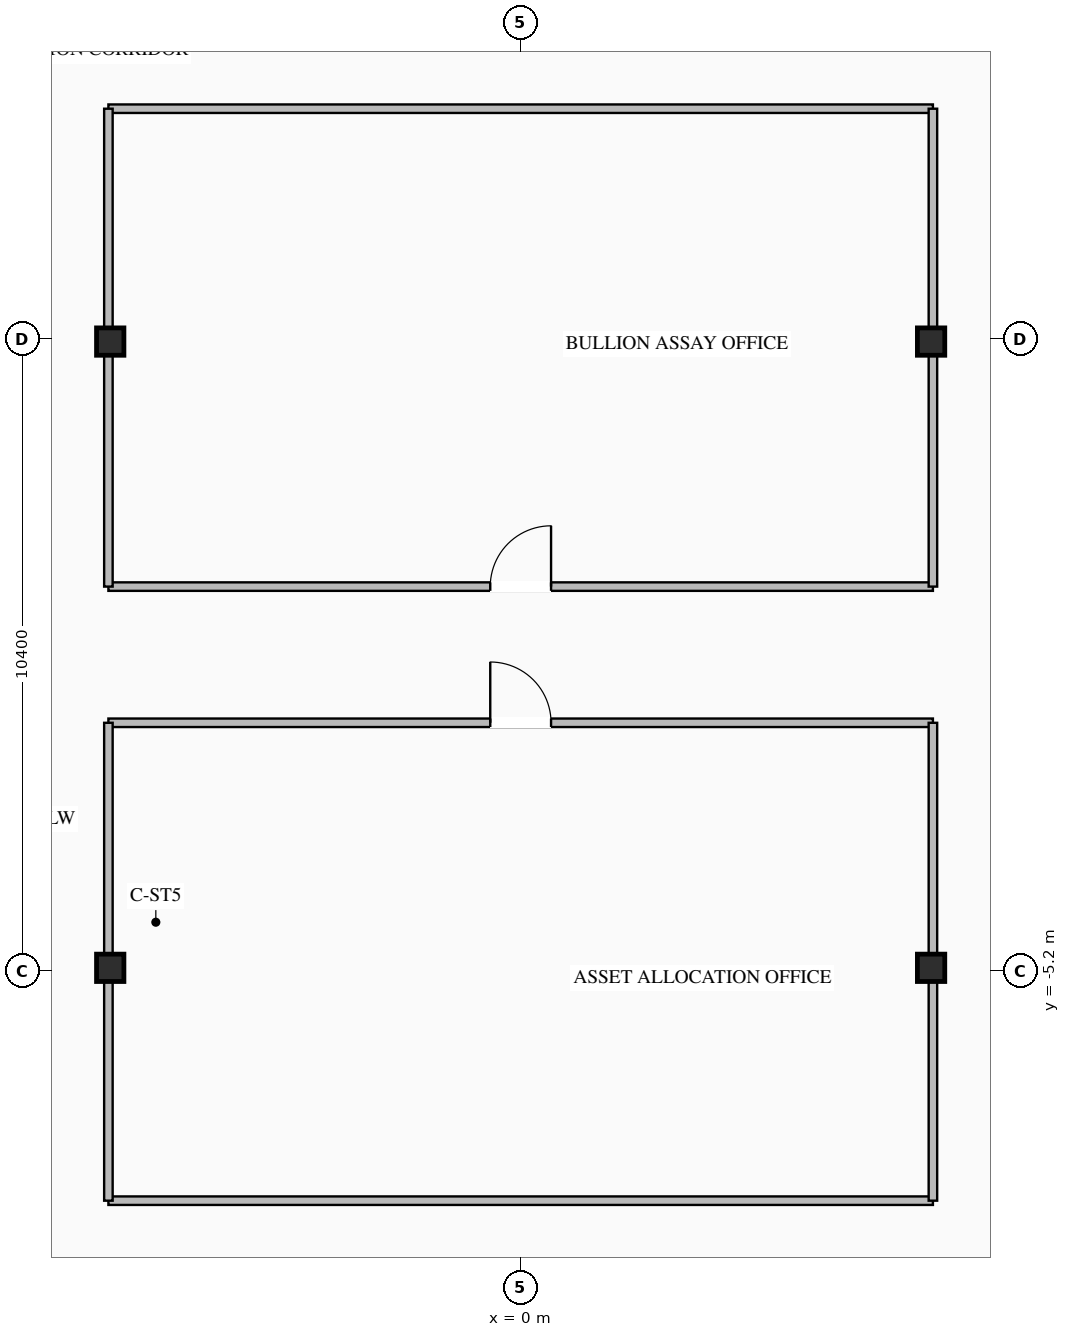
"""IFC4 building model, lengths in metres.
Left out: names, types, materials, properties, quantities, classifications, styles, units other than length and angle.
Written with IfcOpenShell. Run it as: python <this file> out.ifc"""

import sys

from ifc_helpers import new_model, si_unit, direction, frame, frame_2d, origin, origin_2d, place, context, subcontext, project, spatial, rectangle, i_section, extrude, element, fill, save


model = new_model("IFC4")
c1 = context("Model", 3, precision=1e-05, world=origin(), true_north=direction((0.0, 1.0)))
c2 = subcontext(c1, "Body", "Model", "MODEL_VIEW")
j1 = project(units=[si_unit("LENGTHUNIT", "METRE"), si_unit("PLANEANGLEUNIT", "RADIAN")], contexts=[c1])
p1 = place(None, origin())
s1 = spatial("IfcSite", under=j1, at=p1, CompositionType="ELEMENT")
p2 = place(p1, origin())
s2 = spatial("IfcBuilding", under=s1, at=p2, CompositionType="ELEMENT")
p3 = place(p2, frame((0.0, 0.0, 247.5)))
s3 = spatial("IfcBuildingStorey", under=s2, at=p3, CompositionType="ELEMENT", Elevation=247.5)
for number, where, z_axis, x_axis in (
    (1, (-6.75, -5.15, 0.0), (0.0, 0.0, 1.0), (1.0, 0.0, 0.0)),
    (2, (-6.75, 5.15, 0.0), (0.0, 0.0, 1.0), (1.0, 0.0, 0.0)),
    (3, (6.75, -5.15, 0.0), (0.0, 0.0, 1.0), (1.0, 0.0, 0.0)),
    (4, (6.75, 5.15, 0.0), (0.0, 0.0, 1.0), (1.0, 0.0, 0.0)),
):
    element("IfcColumn", number, at=place(p3, frame(where, z_axis=z_axis, x_axis=x_axis)), inside=s3, PredefinedType="COLUMN", context=c2, shape_type="SweptSolid", body=[
        extrude(i_section(OverallWidth=0.45, OverallDepth=0.45, WebThickness=0.022, FlangeThickness=0.032, at=origin_2d()), origin(), (0.0, 0.0, 1.0), 4.2),
    ])
p4 = place(p3, frame((-6.78, 1.12, 0.0), z_axis=(0.0, 0.0, 1.0), x_axis=(1.0, 0.0, 0.0)))
e5 = element("IfcWall", 5, at=p4, inside=s3, PredefinedType="STANDARD", context=c2, shape_type="SweptSolid", body=[
    extrude(rectangle(XDim=13.56, YDim=0.14, at=frame_2d((6.78, 0.0))), origin(), (0.0, 0.0, 1.0), 4.0),
])
p5 = place(p4, frame((6.28, 0.0, 0.0)))
e6 = element("IfcOpeningElement", 6, at=p5, cuts=e5, PredefinedType="OPENING", context=c2, shape_type="SweptSolid", body=[
    extrude(rectangle(XDim=1.0, YDim=2.08, at=frame_2d((0.5, 1.04))), frame((0.0, 0.08, 0.0), z_axis=(0.0, -1.0, 0.0), x_axis=(1.0, 0.0, 0.0)), (0.0, 0.0, 1.0), 0.16),
])
p6 = place(p3, frame((-6.78, 8.98, 0.0), z_axis=(0.0, 0.0, 1.0), x_axis=(1.0, 0.0, 0.0)))
e7 = element("IfcWall", 7, at=p6, inside=s3, PredefinedType="STANDARD", context=c2, shape_type="SweptSolid", body=[
    extrude(rectangle(XDim=13.56, YDim=0.14, at=frame_2d((6.78, 0.0))), origin(), (0.0, 0.0, 1.0), 4.0),
])
for number, where, z_axis, x_axis in (
    (8, (-6.78, 1.12, 0.0), (0.0, 0.0, 1.0), (0.0, 1.0, 0.0)),
    (9, (6.78, 1.12, 0.0), (0.0, 0.0, 1.0), (0.0, 1.0, 0.0)),
):
    element("IfcWall", number, at=place(p3, frame(where, z_axis=z_axis, x_axis=x_axis)), inside=s3, PredefinedType="STANDARD", context=c2, shape_type="SweptSolid", body=[
        extrude(rectangle(XDim=7.86, YDim=0.14, at=frame_2d((3.93, 0.0))), origin(), (0.0, 0.0, 1.0), 3.395),
    ])
p7 = place(p3, frame((-6.78, -1.12, 0.0), z_axis=(0.0, 0.0, 1.0), x_axis=(1.0, 0.0, 0.0)))
e10 = element("IfcWall", 10, at=p7, inside=s3, PredefinedType="STANDARD", context=c2, shape_type="SweptSolid", body=[
    extrude(rectangle(XDim=13.56, YDim=0.14, at=frame_2d((6.78, 0.0))), origin(), (0.0, 0.0, 1.0), 4.0),
])
p8 = place(p7, frame((6.28, 0.0, 0.0)))
e11 = element("IfcOpeningElement", 11, at=p8, cuts=e10, PredefinedType="OPENING", context=c2, shape_type="SweptSolid", body=[
    extrude(rectangle(XDim=1.0, YDim=2.08, at=frame_2d((0.5, 1.04))), frame((0.0, 0.08, 0.0), z_axis=(0.0, -1.0, 0.0), x_axis=(1.0, 0.0, 0.0)), (0.0, 0.0, 1.0), 0.16),
])
p9 = place(p3, frame((-6.78, -8.98, 0.0), z_axis=(0.0, 0.0, 1.0), x_axis=(1.0, 0.0, 0.0)))
e12 = element("IfcWall", 12, at=p9, inside=s3, PredefinedType="STANDARD", context=c2, shape_type="SweptSolid", body=[
    extrude(rectangle(XDim=13.56, YDim=0.14, at=frame_2d((6.78, 0.0))), origin(), (0.0, 0.0, 1.0), 4.0),
])
for number, where, z_axis, x_axis in (
    (13, (-6.78, -8.98, 0.0), (0.0, 0.0, 1.0), (0.0, 1.0, 0.0)),
    (14, (6.78, -8.98, 0.0), (0.0, 0.0, 1.0), (0.0, 1.0, 0.0)),
):
    element("IfcWall", number, at=place(p3, frame(where, z_axis=z_axis, x_axis=x_axis)), inside=s3, PredefinedType="STANDARD", context=c2, shape_type="SweptSolid", body=[
        extrude(rectangle(XDim=7.86, YDim=0.14, at=frame_2d((3.93, 0.0))), origin(), (0.0, 0.0, 1.0), 3.395),
    ])
p10 = place(p5, origin())
e15 = element("IfcDoor", 15, at=p10, inside=s3, OperationType="SINGLE_SWING_RIGHT", PredefinedType="DOOR", context=c2, shape_type="SweptSolid", body=[
    extrude(rectangle(XDim=1.0, YDim=2.08, at=frame_2d((0.5, 1.04))), frame((0.0, 0.025, 0.0), z_axis=(0.0, -1.0, 0.0), x_axis=(1.0, 0.0, 0.0)), (0.0, 0.0, 1.0), 0.05),
])
fill(e6, e15)
p11 = place(p8, origin())
e16 = element("IfcDoor", 16, at=p11, inside=s3, OperationType="SINGLE_SWING_LEFT", PredefinedType="DOOR", context=c2, shape_type="SweptSolid", body=[
    extrude(rectangle(XDim=1.0, YDim=2.08, at=frame_2d((0.5, 1.04))), frame((0.0, 0.025, 0.0), z_axis=(0.0, -1.0, 0.0), x_axis=(1.0, 0.0, 0.0)), (0.0, 0.0, 1.0), 0.05),
])
fill(e11, e16)
save(model, sys.argv[1])
